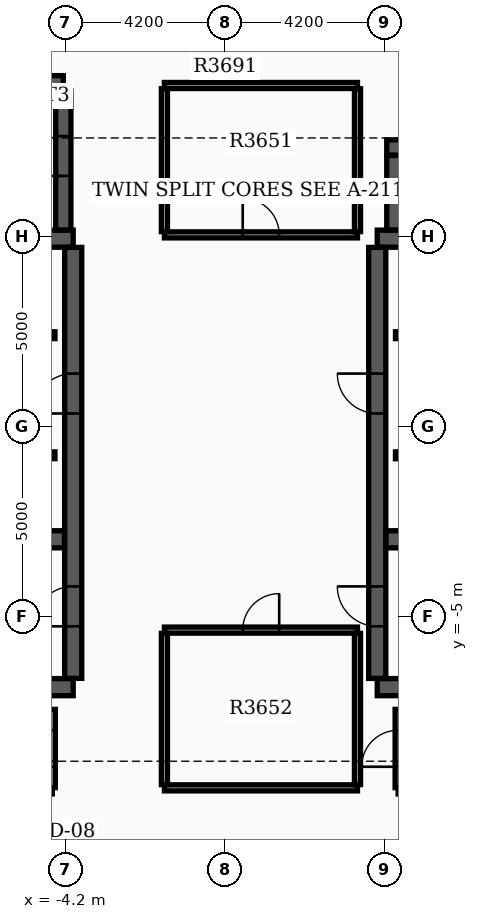
"""IFC4 building model, lengths in metres.
Left out: names, types, materials, properties, quantities, classifications, styles, units other than length and angle.
Written with IfcOpenShell. Run it as: python <this file> out.ifc"""

import sys

from ifc_helpers import new_model, si_unit, direction, frame, frame_2d, origin, place, context, subcontext, project, spatial, rectangle, extrude, element, fill, save


model = new_model("IFC4")
c1 = context("Model", 3, precision=1e-05, world=origin(), true_north=direction((0.0, 1.0)))
c2 = subcontext(c1, "Body", "Model", "MODEL_VIEW")
j1 = project(units=[si_unit("LENGTHUNIT", "METRE"), si_unit("PLANEANGLEUNIT", "RADIAN")], contexts=[c1])
p1 = place(None, origin())
s1 = spatial("IfcSite", under=j1, at=p1, CompositionType="ELEMENT")
p2 = place(p1, origin())
s2 = spatial("IfcBuilding", under=s1, at=p2, CompositionType="ELEMENT")
p3 = place(p2, frame((0.0, 0.0, 228.6)))
s3 = spatial("IfcBuildingStorey", under=s2, at=p3, CompositionType="ELEMENT", Elevation=228.6)
for number, where, z_axis, x_axis in (
    (1, (-12.4, -6.85, 0.0), (0.0, 0.0, 1.0), (1.0, 0.0, 0.0)),
    (2, (-12.4, 4.95, 0.0), (0.0, 0.0, 1.0), (1.0, 0.0, 0.0)),
):
    element("IfcWall", number, at=place(p3, frame(where, z_axis=z_axis, x_axis=x_axis)), inside=s3, PredefinedType="SHEAR", context=c2, shape_type="SweptSolid", body=[
        extrude(rectangle(XDim=8.4, YDim=0.45, at=frame_2d((4.2, 0.0))), origin(), (0.0, 0.0, 1.0), 3.7),
    ])
p4 = place(p3, frame((-4.0, -6.62, 0.0), z_axis=(0.0, 0.0, 1.0), x_axis=(0.0, 1.0, 0.0)))
e3 = element("IfcWall", 3, at=p4, inside=s3, PredefinedType="SHEAR", context=c2, shape_type="SweptSolid", body=[
    extrude(rectangle(XDim=11.34, YDim=0.45, at=frame_2d((5.67, 0.0))), origin(), (0.0, 0.0, 1.0), 3.7),
])
p5 = place(p4, frame((1.37, 0.0, 0.0)))
e4 = element("IfcOpeningElement", 4, at=p5, cuts=e3, PredefinedType="OPENING", context=c2, shape_type="SweptSolid", body=[
    extrude(rectangle(XDim=1.05, YDim=2.15, at=frame_2d((0.525, 1.075))), frame((0.0, 0.235, 0.0), z_axis=(0.0, -1.0, 0.0), x_axis=(1.0, 0.0, 0.0)), (0.0, 0.0, 1.0), 0.47),
])
p6 = place(p4, frame((6.97, 0.0, 0.0)))
e5 = element("IfcOpeningElement", 5, at=p6, cuts=e3, PredefinedType="OPENING", context=c2, shape_type="SweptSolid", body=[
    extrude(rectangle(XDim=1.05, YDim=2.15, at=frame_2d((0.525, 1.075))), frame((0.0, 0.235, 0.0), z_axis=(0.0, -1.0, 0.0), x_axis=(1.0, 0.0, 0.0)), (0.0, 0.0, 1.0), 0.47),
])
p7 = place(p3, frame((-12.17, -2.96, 0.0), z_axis=(0.0, 0.0, 1.0), x_axis=(1.0, 0.0, 0.0)))
e6 = element("IfcWall", 6, at=p7, inside=s3, PredefinedType="SHEAR", context=c2, shape_type="SweptSolid", body=[
    extrude(rectangle(XDim=7.94, YDim=0.45, at=frame_2d((3.97, 0.0))), origin(), (0.0, 0.0, 1.0), 3.7),
])
for number, where, z_axis, x_axis in (
    (7, (4.0, -6.85, 0.0), (0.0, 0.0, 1.0), (1.0, 0.0, 0.0)),
    (8, (4.0, 4.95, 0.0), (0.0, 0.0, 1.0), (1.0, 0.0, 0.0)),
):
    element("IfcWall", number, at=place(p3, frame(where, z_axis=z_axis, x_axis=x_axis)), inside=s3, PredefinedType="SHEAR", context=c2, shape_type="SweptSolid", body=[
        extrude(rectangle(XDim=8.4, YDim=0.45, at=frame_2d((4.2, 0.0))), origin(), (0.0, 0.0, 1.0), 3.7),
    ])
p8 = place(p3, frame((4.0, -6.62, 0.0), z_axis=(0.0, 0.0, 1.0), x_axis=(0.0, 1.0, 0.0)))
e9 = element("IfcWall", 9, at=p8, inside=s3, PredefinedType="SHEAR", context=c2, shape_type="SweptSolid", body=[
    extrude(rectangle(XDim=11.34, YDim=0.45, at=frame_2d((5.67, 0.0))), origin(), (0.0, 0.0, 1.0), 3.7),
])
p9 = place(p8, frame((1.37, 0.0, 0.0)))
e10 = element("IfcOpeningElement", 10, at=p9, cuts=e9, PredefinedType="OPENING", context=c2, shape_type="SweptSolid", body=[
    extrude(rectangle(XDim=1.05, YDim=2.15, at=frame_2d((0.525, 1.075))), frame((0.0, 0.235, 0.0), z_axis=(0.0, -1.0, 0.0), x_axis=(1.0, 0.0, 0.0)), (0.0, 0.0, 1.0), 0.47),
])
p10 = place(p8, frame((6.97, 0.0, 0.0)))
e11 = element("IfcOpeningElement", 11, at=p10, cuts=e9, PredefinedType="OPENING", context=c2, shape_type="SweptSolid", body=[
    extrude(rectangle(XDim=1.05, YDim=2.15, at=frame_2d((0.525, 1.075))), frame((0.0, 0.235, 0.0), z_axis=(0.0, -1.0, 0.0), x_axis=(1.0, 0.0, 0.0)), (0.0, 0.0, 1.0), 0.47),
])
p11 = place(p3, frame((4.23, -2.96, 0.0), z_axis=(0.0, 0.0, 1.0), x_axis=(1.0, 0.0, 0.0)))
e12 = element("IfcWall", 12, at=p11, inside=s3, PredefinedType="SHEAR", context=c2, shape_type="SweptSolid", body=[
    extrude(rectangle(XDim=7.94, YDim=0.45, at=frame_2d((3.97, 0.0))), origin(), (0.0, 0.0, 1.0), 3.7),
])
p12 = place(p3, frame((-12.22, 9.04, 0.0), z_axis=(0.0, 0.0, 1.0), x_axis=(1.0, 0.0, 0.0)))
e13 = element("IfcWall", 13, at=p12, inside=s3, PredefinedType="SHEAR", context=c2, shape_type="SweptSolid", body=[
    extrude(rectangle(XDim=7.96, YDim=0.4, at=frame_2d((3.98, 0.0))), origin(), (0.0, 0.0, 1.0), 3.7),
])
p13 = place(p3, frame((-4.26, 5.18, 0.0), z_axis=(0.0, 0.0, 1.0), x_axis=(0.0, 1.0, 0.0)))
e14 = element("IfcWall", 14, at=p13, inside=s3, PredefinedType="SHEAR", context=c2, shape_type="SweptSolid", body=[
    extrude(rectangle(XDim=3.655, YDim=0.4, at=frame_2d((1.828, 0.0))), origin(), (0.0, 0.0, 1.0), 3.7),
])
p14 = place(p13, frame((1.42, 0.0, 0.0)))
e15 = element("IfcOpeningElement", 15, at=p14, cuts=e14, PredefinedType="OPENING", context=c2, shape_type="SweptSolid", body=[
    extrude(rectangle(XDim=1.05, YDim=2.15, at=frame_2d((0.525, 1.075))), frame((0.0, 0.21, 0.0), z_axis=(0.0, -1.0, 0.0), x_axis=(1.0, 0.0, 0.0)), (0.0, 0.0, 1.0), 0.42),
])
p15 = place(p3, frame((4.45, 5.18, 0.0), z_axis=(0.0, 0.0, 1.0), x_axis=(0.0, 1.0, 0.0)))
e16 = element("IfcWall", 16, at=p15, inside=s3, PredefinedType="SHEAR", context=c2, shape_type="SweptSolid", body=[
    extrude(rectangle(XDim=1.96, YDim=0.4, at=frame_2d((0.98, 0.0))), origin(), (0.0, 0.0, 1.0), 3.7),
])
p16 = place(p3, frame((4.25, 7.35, 0.0), z_axis=(0.0, 0.0, 1.0), x_axis=(1.0, 0.0, 0.0)))
e17 = element("IfcWall", 17, at=p16, inside=s3, PredefinedType="SHEAR", context=c2, shape_type="SweptSolid", body=[
    extrude(rectangle(XDim=5.4, YDim=0.4, at=frame_2d((2.7, 0.0))), origin(), (0.0, 0.0, 1.0), 3.7),
])
p17 = place(p3, frame((-11.9, 2.41, 0.0), z_axis=(0.0, 0.0, 1.0), x_axis=(1.0, 0.0, 0.0)))
e18 = element("IfcWall", 18, at=p17, inside=s3, PredefinedType="SOLIDWALL", context=c2, shape_type="SweptSolid", body=[
    extrude(rectangle(XDim=7.42, YDim=0.18, at=frame_2d((3.71, 0.0))), origin(), (0.0, 0.0, 1.0), 3.17),
])
p18 = place(p17, frame((0.55, 0.0, 0.0)))
e19 = element("IfcOpeningElement", 19, at=p18, cuts=e18, PredefinedType="OPENING", context=c2, shape_type="SweptSolid", body=[
    extrude(rectangle(XDim=1.1, YDim=2.15, at=frame_2d((0.55, 1.075))), frame((0.0, 0.1, 0.0), z_axis=(0.0, -1.0, 0.0), x_axis=(1.0, 0.0, 0.0)), (0.0, 0.0, 1.0), 0.2),
])
p19 = place(p17, frame((4.9, 0.0, 0.0)))
e20 = element("IfcOpeningElement", 20, at=p19, cuts=e18, PredefinedType="OPENING", context=c2, shape_type="SweptSolid", body=[
    extrude(rectangle(XDim=0.88, YDim=2.1, at=frame_2d((0.44, 1.05))), frame((0.0, 0.1, 0.0), z_axis=(0.0, -1.0, 0.0), x_axis=(1.0, 0.0, 0.0)), (0.0, 0.0, 1.0), 0.2),
])
p20 = place(p3, frame((4.48, 2.41, 0.0), z_axis=(0.0, 0.0, 1.0), x_axis=(1.0, 0.0, 0.0)))
e21 = element("IfcWall", 21, at=p20, inside=s3, PredefinedType="SOLIDWALL", context=c2, shape_type="SweptSolid", body=[
    extrude(rectangle(XDim=7.42, YDim=0.18, at=frame_2d((3.71, 0.0))), origin(), (0.0, 0.0, 1.0), 3.17),
])
p21 = place(p20, frame((5.67, 0.0, 0.0)))
e22 = element("IfcOpeningElement", 22, at=p21, cuts=e21, PredefinedType="OPENING", context=c2, shape_type="SweptSolid", body=[
    extrude(rectangle(XDim=1.1, YDim=2.15, at=frame_2d((0.55, 1.075))), frame((0.0, 0.1, 0.0), z_axis=(0.0, -1.0, 0.0), x_axis=(1.0, 0.0, 0.0)), (0.0, 0.0, 1.0), 0.2),
])
p22 = place(p20, frame((1.6, 0.0, 0.0)))
e23 = element("IfcOpeningElement", 23, at=p22, cuts=e21, PredefinedType="OPENING", context=c2, shape_type="SweptSolid", body=[
    extrude(rectangle(XDim=0.88, YDim=2.1, at=frame_2d((0.44, 1.05))), frame((0.0, 0.1, 0.0), z_axis=(0.0, -1.0, 0.0), x_axis=(1.0, 0.0, 0.0)), (0.0, 0.0, 1.0), 0.2),
])
p23 = place(p3, frame((-11.9, -0.75, 0.0), z_axis=(0.0, 0.0, 1.0), x_axis=(1.0, 0.0, 0.0)))
e24 = element("IfcWall", 24, at=p23, inside=s3, PredefinedType="SOLIDWALL", context=c2, shape_type="SweptSolid", body=[
    extrude(rectangle(XDim=7.42, YDim=0.18, at=frame_2d((3.71, 0.0))), origin(), (0.0, 0.0, 1.0), 3.17),
])
p24 = place(p23, frame((5.75, 0.0, 0.0)))
e25 = element("IfcOpeningElement", 25, at=p24, cuts=e24, PredefinedType="OPENING", context=c2, shape_type="SweptSolid", body=[
    extrude(rectangle(XDim=1.1, YDim=2.15, at=frame_2d((0.55, 1.075))), frame((0.0, 0.1, 0.0), z_axis=(0.0, -1.0, 0.0), x_axis=(1.0, 0.0, 0.0)), (0.0, 0.0, 1.0), 0.2),
])
p25 = place(p23, frame((1.6, 0.0, 0.0)))
e26 = element("IfcOpeningElement", 26, at=p25, cuts=e24, PredefinedType="OPENING", context=c2, shape_type="SweptSolid", body=[
    extrude(rectangle(XDim=0.88, YDim=2.1, at=frame_2d((0.44, 1.05))), frame((0.0, 0.1, 0.0), z_axis=(0.0, -1.0, 0.0), x_axis=(1.0, 0.0, 0.0)), (0.0, 0.0, 1.0), 0.2),
])
p26 = place(p3, frame((4.48, -0.75, 0.0), z_axis=(0.0, 0.0, 1.0), x_axis=(1.0, 0.0, 0.0)))
e27 = element("IfcWall", 27, at=p26, inside=s3, PredefinedType="SOLIDWALL", context=c2, shape_type="SweptSolid", body=[
    extrude(rectangle(XDim=7.42, YDim=0.18, at=frame_2d((3.71, 0.0))), origin(), (0.0, 0.0, 1.0), 3.17),
])
p27 = place(p26, frame((3.92, 0.0, 0.0)))
e28 = element("IfcOpeningElement", 28, at=p27, cuts=e27, PredefinedType="OPENING", context=c2, shape_type="SweptSolid", body=[
    extrude(rectangle(XDim=1.1, YDim=2.15, at=frame_2d((0.55, 1.075))), frame((0.0, 0.1, 0.0), z_axis=(0.0, -1.0, 0.0), x_axis=(1.0, 0.0, 0.0)), (0.0, 0.0, 1.0), 0.2),
])
p28 = place(p26, frame((5.82, 0.0, 0.0)))
e29 = element("IfcOpeningElement", 29, at=p28, cuts=e27, PredefinedType="OPENING", context=c2, shape_type="SweptSolid", body=[
    extrude(rectangle(XDim=1.1, YDim=2.15, at=frame_2d((0.55, 1.075))), frame((0.0, 0.1, 0.0), z_axis=(0.0, -1.0, 0.0), x_axis=(1.0, 0.0, 0.0)), (0.0, 0.0, 1.0), 0.2),
])
p29 = place(p26, frame((1.6, 0.0, 0.0)))
e30 = element("IfcOpeningElement", 30, at=p29, cuts=e27, PredefinedType="OPENING", context=c2, shape_type="SweptSolid", body=[
    extrude(rectangle(XDim=0.88, YDim=2.1, at=frame_2d((0.44, 1.05))), frame((0.0, 0.1, 0.0), z_axis=(0.0, -1.0, 0.0), x_axis=(1.0, 0.0, 0.0)), (0.0, 0.0, 1.0), 0.2),
])
p30 = place(p3, frame((-1.6, 5.05, 0.0), z_axis=(0.0, 0.0, 1.0), x_axis=(1.0, 0.0, 0.0)))
e31 = element("IfcWall", 31, at=p30, inside=s3, PredefinedType="PARTITIONING", context=c2, shape_type="SweptSolid", body=[
    extrude(rectangle(XDim=5.08, YDim=0.16, at=frame_2d((2.54, 0.0))), origin(), (0.0, 0.0, 1.0), 3.17),
])
p31 = place(p30, frame((2.06, 0.0, 0.0)))
e32 = element("IfcOpeningElement", 32, at=p31, cuts=e31, PredefinedType="OPENING", context=c2, shape_type="SweptSolid", body=[
    extrude(rectangle(XDim=0.96, YDim=2.15, at=frame_2d((0.48, 1.075))), frame((0.0, 0.09, 0.0), z_axis=(0.0, -1.0, 0.0), x_axis=(1.0, 0.0, 0.0)), (0.0, 0.0, 1.0), 0.18),
])
p32 = place(p3, frame((-1.6, 8.98, 0.0), z_axis=(0.0, 0.0, 1.0), x_axis=(1.0, 0.0, 0.0)))
e33 = element("IfcWall", 33, at=p32, inside=s3, PredefinedType="PARTITIONING", context=c2, shape_type="SweptSolid", body=[
    extrude(rectangle(XDim=5.08, YDim=0.16, at=frame_2d((2.54, 0.0))), origin(), (0.0, 0.0, 1.0), 3.17),
])
for number, where, z_axis, x_axis in (
    (34, (-1.6, 5.135, 0.0), (0.0, 0.0, 1.0), (0.0, 1.0, 0.0)),
    (35, (3.48, 5.135, 0.0), (0.0, 0.0, 1.0), (0.0, 1.0, 0.0)),
):
    element("IfcWall", number, at=place(p3, frame(where, z_axis=z_axis, x_axis=x_axis)), inside=s3, PredefinedType="PARTITIONING", context=c2, shape_type="SweptSolid", body=[
        extrude(rectangle(XDim=3.76, YDim=0.16, at=frame_2d((1.88, 0.0))), origin(), (0.0, 0.0, 1.0), 3.17),
    ])
p33 = place(p3, frame((-1.6, -9.5, 0.0), z_axis=(0.0, 0.0, 1.0), x_axis=(1.0, 0.0, 0.0)))
e36 = element("IfcWall", 36, at=p33, inside=s3, PredefinedType="PARTITIONING", context=c2, shape_type="SweptSolid", body=[
    extrude(rectangle(XDim=5.08, YDim=0.16, at=frame_2d((2.54, 0.0))), origin(), (0.0, 0.0, 1.0), 3.17),
])
p34 = place(p3, frame((-1.6, -5.35, 0.0), z_axis=(0.0, 0.0, 1.0), x_axis=(1.0, 0.0, 0.0)))
e37 = element("IfcWall", 37, at=p34, inside=s3, PredefinedType="PARTITIONING", context=c2, shape_type="SweptSolid", body=[
    extrude(rectangle(XDim=5.08, YDim=0.16, at=frame_2d((2.54, 0.0))), origin(), (0.0, 0.0, 1.0), 3.17),
])
p35 = place(p34, frame((2.06, 0.0, 0.0)))
e38 = element("IfcOpeningElement", 38, at=p35, cuts=e37, PredefinedType="OPENING", context=c2, shape_type="SweptSolid", body=[
    extrude(rectangle(XDim=0.96, YDim=2.15, at=frame_2d((0.48, 1.075))), frame((0.0, 0.09, 0.0), z_axis=(0.0, -1.0, 0.0), x_axis=(1.0, 0.0, 0.0)), (0.0, 0.0, 1.0), 0.18),
])
for number, where, z_axis, x_axis in (
    (39, (-1.6, -9.415, 0.0), (0.0, 0.0, 1.0), (0.0, 1.0, 0.0)),
    (40, (3.48, -9.415, 0.0), (0.0, 0.0, 1.0), (0.0, 1.0, 0.0)),
):
    element("IfcWall", number, at=place(p3, frame(where, z_axis=z_axis, x_axis=x_axis)), inside=s3, PredefinedType="PARTITIONING", context=c2, shape_type="SweptSolid", body=[
        extrude(rectangle(XDim=3.98, YDim=0.16, at=frame_2d((1.99, 0.0))), origin(), (0.0, 0.0, 1.0), 3.17),
    ])
p36 = place(p3, frame((4.55, -9.58, 0.0), z_axis=(0.0, 0.0, 1.0), x_axis=(1.0, 0.0, 0.0)))
e41 = element("IfcWall", 41, at=p36, inside=s3, PredefinedType="PARTITIONING", context=c2, shape_type="SweptSolid", body=[
    extrude(rectangle(XDim=8.1, YDim=0.16, at=frame_2d((4.05, 0.0))), origin(), (0.0, 0.0, 1.0), 3.17),
])
p37 = place(p3, frame((4.55, -9.495, 0.0), z_axis=(0.0, 0.0, 1.0), x_axis=(0.0, 1.0, 0.0)))
e42 = element("IfcWall", 42, at=p37, inside=s3, PredefinedType="PARTITIONING", context=c2, shape_type="SweptSolid", body=[
    extrude(rectangle(XDim=2.06, YDim=0.16, at=frame_2d((1.03, 0.0))), origin(), (0.0, 0.0, 1.0), 3.17),
])
p38 = place(p37, frame((0.55, 0.0, 0.0)))
e43 = element("IfcOpeningElement", 43, at=p38, cuts=e42, PredefinedType="OPENING", context=c2, shape_type="SweptSolid", body=[
    extrude(rectangle(XDim=0.96, YDim=2.15, at=frame_2d((0.48, 1.075))), frame((0.0, 0.09, 0.0), z_axis=(0.0, -1.0, 0.0), x_axis=(1.0, 0.0, 0.0)), (0.0, 0.0, 1.0), 0.18),
])
p39 = place(p3, frame((-4.55, -9.495, 0.0), z_axis=(0.0, 0.0, 1.0), x_axis=(0.0, 1.0, 0.0)))
e44 = element("IfcWall", 44, at=p39, inside=s3, PredefinedType="PARTITIONING", context=c2, shape_type="SweptSolid", body=[
    extrude(rectangle(XDim=2.06, YDim=0.16, at=frame_2d((1.03, 0.0))), origin(), (0.0, 0.0, 1.0), 3.17),
])
p40 = place(p39, frame((0.55, 0.0, 0.0)))
e45 = element("IfcOpeningElement", 45, at=p40, cuts=e44, PredefinedType="OPENING", context=c2, shape_type="SweptSolid", body=[
    extrude(rectangle(XDim=0.96, YDim=2.15, at=frame_2d((0.48, 1.075))), frame((0.0, 0.09, 0.0), z_axis=(0.0, -1.0, 0.0), x_axis=(1.0, 0.0, 0.0)), (0.0, 0.0, 1.0), 0.18),
])
p41 = place(p5, origin())
e46 = element("IfcDoor", 46, at=p41, inside=s3, OperationType="SINGLE_SWING_LEFT", PredefinedType="DOOR", context=c2, shape_type="SweptSolid", body=[
    extrude(rectangle(XDim=1.05, YDim=2.15, at=frame_2d((0.525, 1.075))), frame((0.0, 0.025, 0.0), z_axis=(0.0, -1.0, 0.0), x_axis=(1.0, 0.0, 0.0)), (0.0, 0.0, 1.0), 0.05),
])
fill(e4, e46)
p42 = place(p9, origin())
e47 = element("IfcDoor", 47, at=p42, inside=s3, OperationType="SINGLE_SWING_RIGHT", PredefinedType="DOOR", context=c2, shape_type="SweptSolid", body=[
    extrude(rectangle(XDim=1.05, YDim=2.15, at=frame_2d((0.525, 1.075))), frame((0.0, 0.025, 0.0), z_axis=(0.0, -1.0, 0.0), x_axis=(1.0, 0.0, 0.0)), (0.0, 0.0, 1.0), 0.05),
])
fill(e10, e47)
p43 = place(p6, origin())
e48 = element("IfcDoor", 48, at=p43, inside=s3, OperationType="SINGLE_SWING_LEFT", PredefinedType="DOOR", context=c2, shape_type="SweptSolid", body=[
    extrude(rectangle(XDim=1.05, YDim=2.15, at=frame_2d((0.525, 1.075))), frame((0.0, 0.025, 0.0), z_axis=(0.0, -1.0, 0.0), x_axis=(1.0, 0.0, 0.0)), (0.0, 0.0, 1.0), 0.05),
])
fill(e5, e48)
p44 = place(p10, origin())
e49 = element("IfcDoor", 49, at=p44, inside=s3, OperationType="SINGLE_SWING_RIGHT", PredefinedType="DOOR", context=c2, shape_type="SweptSolid", body=[
    extrude(rectangle(XDim=1.05, YDim=2.15, at=frame_2d((0.525, 1.075))), frame((0.0, 0.025, 0.0), z_axis=(0.0, -1.0, 0.0), x_axis=(1.0, 0.0, 0.0)), (0.0, 0.0, 1.0), 0.05),
])
fill(e11, e49)
p45 = place(p14, origin())
e50 = element("IfcDoor", 50, at=p45, inside=s3, OperationType="SINGLE_SWING_LEFT", PredefinedType="DOOR", context=c2, shape_type="SweptSolid", body=[
    extrude(rectangle(XDim=1.05, YDim=2.15, at=frame_2d((0.525, 1.075))), frame((0.0, 0.025, 0.0), z_axis=(0.0, -1.0, 0.0), x_axis=(1.0, 0.0, 0.0)), (0.0, 0.0, 1.0), 0.05),
])
fill(e15, e50)
p46 = place(p31, origin())
e51 = element("IfcDoor", 51, at=p46, inside=s3, OperationType="SINGLE_SWING_LEFT", PredefinedType="DOOR", context=c2, shape_type="SweptSolid", body=[
    extrude(rectangle(XDim=0.96, YDim=2.15, at=frame_2d((0.48, 1.075))), frame((0.0, 0.025, 0.0), z_axis=(0.0, -1.0, 0.0), x_axis=(1.0, 0.0, 0.0)), (0.0, 0.0, 1.0), 0.05),
])
fill(e32, e51)
p47 = place(p35, origin())
e52 = element("IfcDoor", 52, at=p47, inside=s3, OperationType="SINGLE_SWING_RIGHT", PredefinedType="DOOR", context=c2, shape_type="SweptSolid", body=[
    extrude(rectangle(XDim=0.96, YDim=2.15, at=frame_2d((0.48, 1.075))), frame((0.0, 0.025, 0.0), z_axis=(0.0, -1.0, 0.0), x_axis=(1.0, 0.0, 0.0)), (0.0, 0.0, 1.0), 0.05),
])
fill(e38, e52)
p48 = place(p38, origin())
e53 = element("IfcDoor", 53, at=p48, inside=s3, OperationType="SINGLE_SWING_LEFT", PredefinedType="DOOR", context=c2, shape_type="SweptSolid", body=[
    extrude(rectangle(XDim=0.96, YDim=2.15, at=frame_2d((0.48, 1.075))), frame((0.0, 0.025, 0.0), z_axis=(0.0, -1.0, 0.0), x_axis=(1.0, 0.0, 0.0)), (0.0, 0.0, 1.0), 0.05),
])
fill(e43, e53)
p49 = place(p40, origin())
e54 = element("IfcDoor", 54, at=p49, inside=s3, OperationType="SINGLE_SWING_RIGHT", PredefinedType="DOOR", context=c2, shape_type="SweptSolid", body=[
    extrude(rectangle(XDim=0.96, YDim=2.15, at=frame_2d((0.48, 1.075))), frame((0.0, 0.025, 0.0), z_axis=(0.0, -1.0, 0.0), x_axis=(1.0, 0.0, 0.0)), (0.0, 0.0, 1.0), 0.05),
])
fill(e45, e54)
save(model, sys.argv[1])
